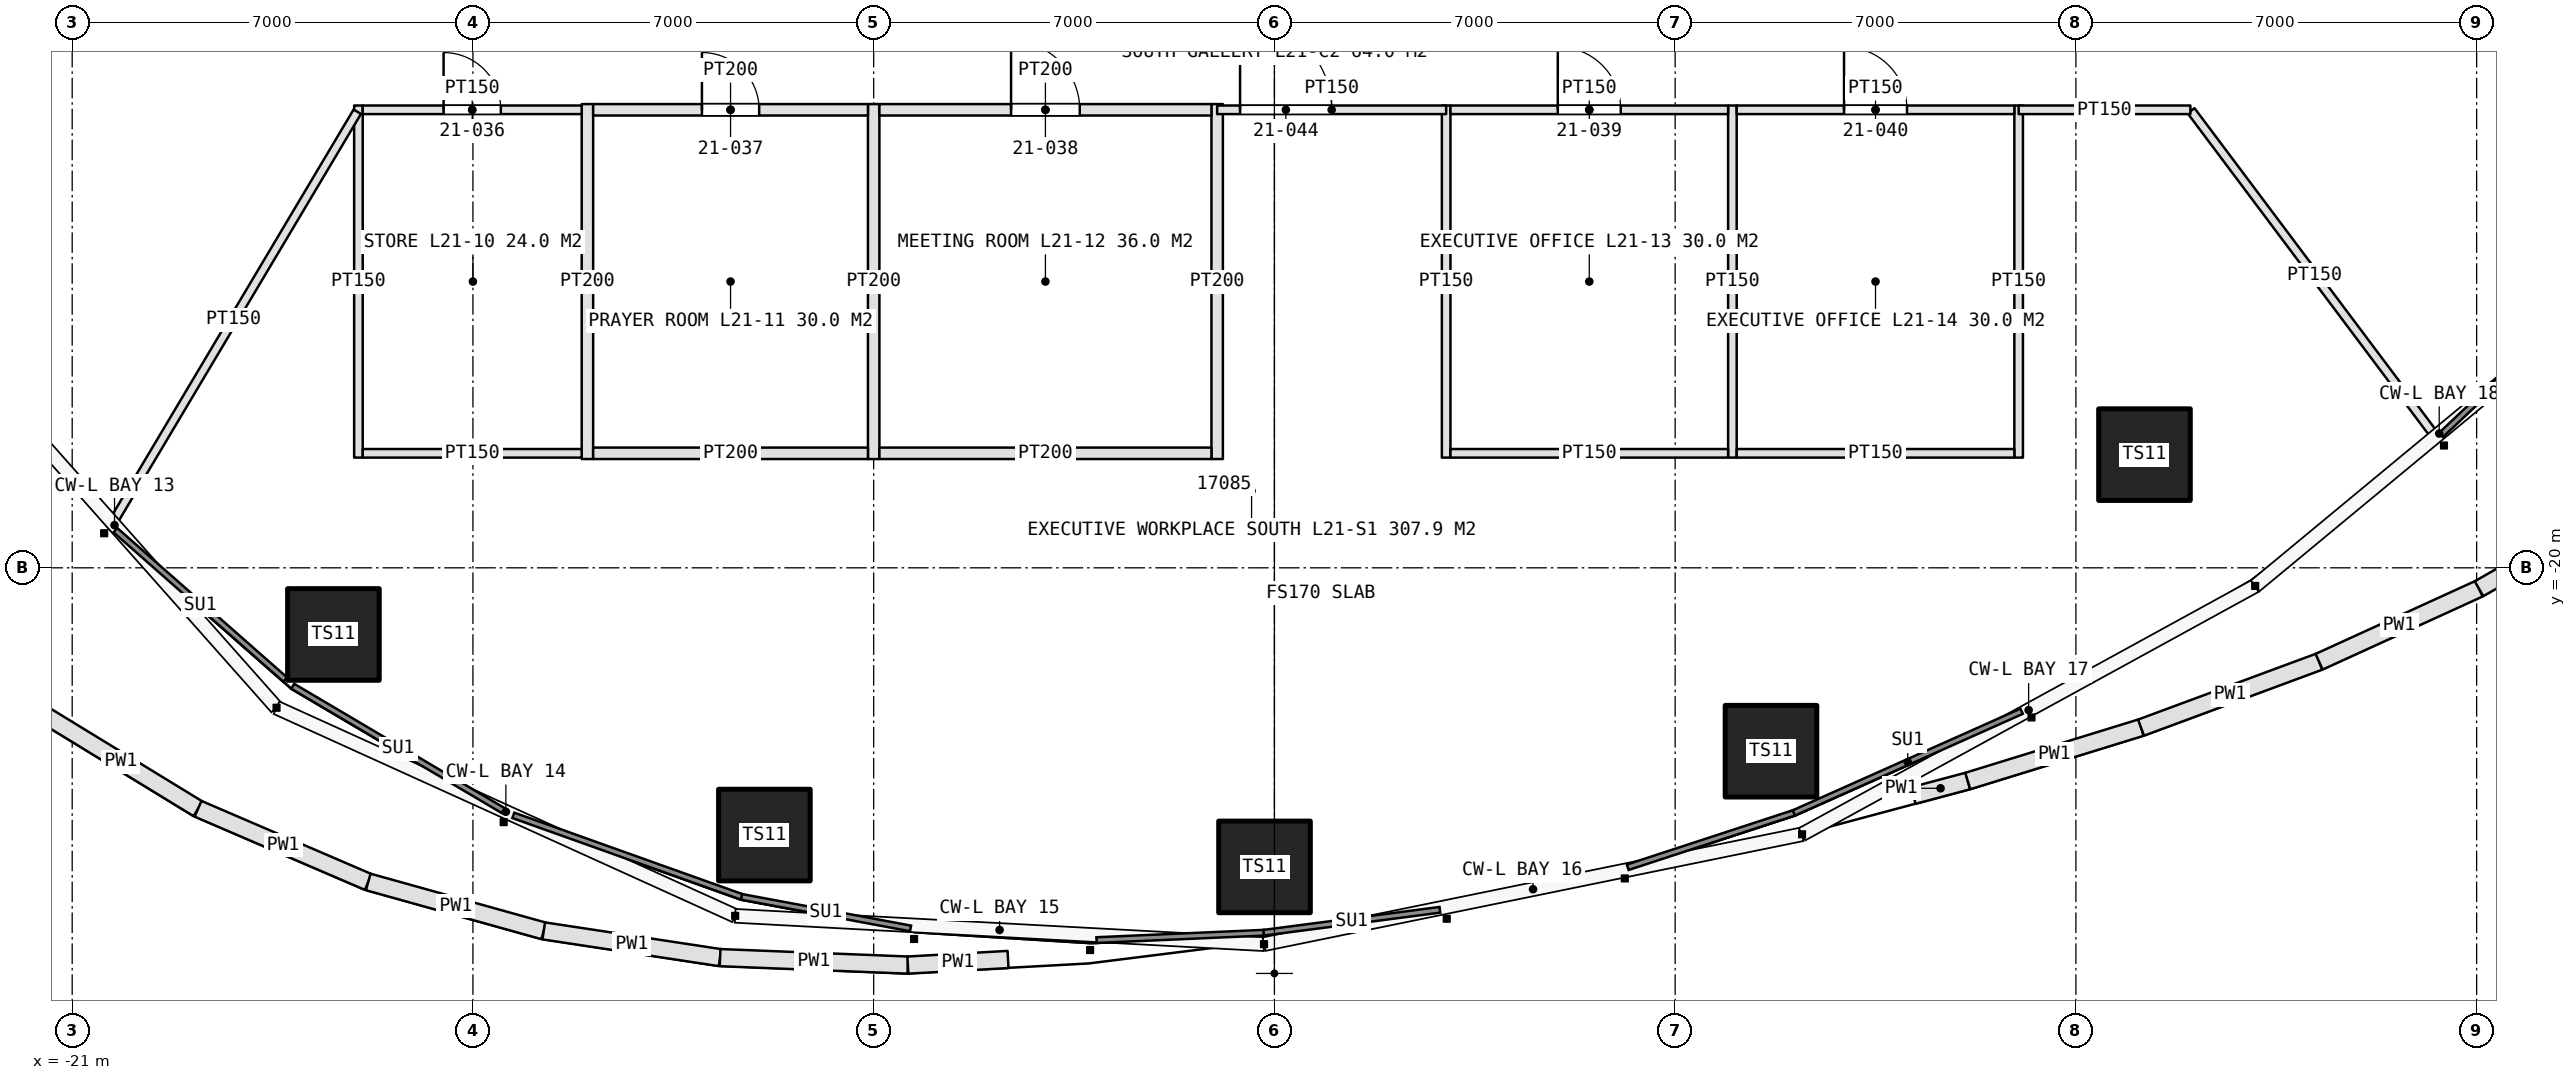
"""IFC4 building model, lengths in metres.
Left out: names, types, materials, properties, quantities, classifications, styles, units other than length and angle.
Written with IfcOpenShell. Run it as: python <this file> out.ifc"""

import sys

from ifc_helpers import new_model, si_unit, direction, frame, frame_2d, origin, origin_2d, place, context, subcontext, project, spatial, rectangle, hollow_rectangle, extrude, element, fill, save


model = new_model("IFC4")
c1 = context("Model", 3, precision=1e-05, world=origin(), true_north=direction((0.0, 1.0)))
c2 = subcontext(c1, "Body", "Model", "MODEL_VIEW")
j1 = project(units=[si_unit("LENGTHUNIT", "METRE"), si_unit("PLANEANGLEUNIT", "RADIAN")], contexts=[c1])
p1 = place(None, origin())
s1 = spatial("IfcSite", under=j1, at=p1, CompositionType="ELEMENT")
p2 = place(p1, origin())
s2 = spatial("IfcBuilding", under=s1, at=p2, CompositionType="ELEMENT")
p3 = place(p2, frame((0.0, 0.0, 105.0)))
s3 = spatial("IfcBuildingStorey", under=s2, at=p3, CompositionType="ELEMENT", Elevation=105.0)
p4 = place(p3, frame((-16.437, -21.164, 0.975), z_axis=(0.0, 0.0, 1.0), x_axis=(1.0, 0.0, 0.0)))
e1 = element("IfcColumn", 1, at=p4, inside=s3, PredefinedType="COLUMN", context=c2, shape_type="SweptSolid", body=[
    extrude(hollow_rectangle(XDim=1.6, YDim=1.6, WallThickness=0.15, at=origin_2d()), origin(), (0.0, 0.0, 1.0), 3.225),
])
for number, where, z_axis, x_axis in (
    (2, (-8.909, -24.668, 0.0), (0.0, 0.0, 1.0), (1.0, 0.0, 0.0)),
    (3, (-0.173, -25.224, 0.0), (0.0, 0.0, 1.0), (1.0, 0.0, 0.0)),
    (4, (8.674, -23.203, 0.0), (0.0, 0.0, 1.0), (1.0, 0.0, 0.0)),
):
    element("IfcColumn", number, at=place(p3, frame(where, z_axis=z_axis, x_axis=x_axis)), inside=s3, PredefinedType="COLUMN", context=c2, shape_type="SweptSolid", body=[
        extrude(hollow_rectangle(XDim=1.6, YDim=1.6, WallThickness=0.15, at=origin_2d()), origin(), (0.0, 0.0, 1.0), 4.2),
    ])
p5 = place(p3, frame((15.198, -18.023, 0.975), z_axis=(0.0, 0.0, 1.0), x_axis=(1.0, 0.0, 0.0)))
e5 = element("IfcColumn", 5, at=p5, inside=s3, PredefinedType="COLUMN", context=c2, shape_type="SweptSolid", body=[
    extrude(hollow_rectangle(XDim=1.6, YDim=1.6, WallThickness=0.15, at=origin_2d()), origin(), (0.0, 0.0, 1.0), 3.225),
])
p6 = place(p3, frame((-21.496, -22.562, 0.0), z_axis=(0.0, 0.0, 1.0), x_axis=(0.853268453742, -0.52147190322, 0.0)))
e6 = element("IfcWall", 6, at=p6, inside=s3, PredefinedType="PARAPET", context=c2, shape_type="SweptSolid", body=[
    extrude(rectangle(XDim=3.157, YDim=0.3, at=frame_2d((1.579, 0.0))), origin(), (0.0, 0.0, 1.0), 1.1),
])
p7 = place(p3, frame((-18.802, -24.209, 0.0), z_axis=(0.0, 0.0, 1.0), x_axis=(0.91866042568, -0.395048126549, 0.0)))
e7 = element("IfcWall", 7, at=p7, inside=s3, PredefinedType="PARAPET", context=c2, shape_type="SweptSolid", body=[
    extrude(rectangle(XDim=3.236, YDim=0.3, at=frame_2d((1.618, 0.0))), origin(), (0.0, 0.0, 1.0), 1.1),
])
p8 = place(p3, frame((-15.829, -25.487, 0.0), z_axis=(0.0, 0.0, 1.0), x_axis=(0.963292299326, -0.26845473745, 0.0)))
e8 = element("IfcWall", 8, at=p8, inside=s3, PredefinedType="PARAPET", context=c2, shape_type="SweptSolid", body=[
    extrude(rectangle(XDim=3.183, YDim=0.3, at=frame_2d((1.592, 0.0))), origin(), (0.0, 0.0, 1.0), 1.1),
])
p9 = place(p3, frame((-12.763, -26.342, 0.0), z_axis=(0.0, 0.0, 1.0), x_axis=(0.988698262217, -0.1499191325, 0.0)))
e9 = element("IfcWall", 9, at=p9, inside=s3, PredefinedType="PARAPET", context=c2, shape_type="SweptSolid", body=[
    extrude(rectangle(XDim=3.115, YDim=0.3, at=frame_2d((1.558, 0.0))), origin(), (0.0, 0.0, 1.0), 1.1),
])
p10 = place(p3, frame((-9.683, -26.809, 0.0), z_axis=(0.0, 0.0, 1.0), x_axis=(0.999210908171, -0.039718522031, 0.0)))
e10 = element("IfcWall", 10, at=p10, inside=s3, PredefinedType="PARAPET", context=c2, shape_type="SweptSolid", body=[
    extrude(rectangle(XDim=3.282, YDim=0.3, at=frame_2d((1.641, 0.0))), origin(), (0.0, 0.0, 1.0), 1.1),
])
p11 = place(p3, frame((-6.403, -26.939, 0.0), z_axis=(0.0, 0.0, 1.0), x_axis=(0.998438849292, 0.055855744778, 0.0)))
e11 = element("IfcWall", 11, at=p11, inside=s3, PredefinedType="PARAPET", context=c2, shape_type="SweptSolid", body=[
    extrude(rectangle(XDim=1.753, YDim=0.3, at=frame_2d((0.876, 0.0))), origin(), (0.0, 0.0, 1.0), 1.1),
])
p12 = place(p3, frame((11.16, -23.978, 0.0), z_axis=(0.0, 0.0, 1.0), x_axis=(0.966230823198, 0.257678086577, 0.0)))
e12 = element("IfcWall", 12, at=p12, inside=s3, PredefinedType="PARAPET", context=c2, shape_type="SweptSolid", body=[
    extrude(rectangle(XDim=0.984, YDim=0.3, at=frame_2d((0.492, 0.0))), origin(), (0.0, 0.0, 1.0), 1.1),
])
p13 = place(p3, frame((12.112, -23.724, 0.0), z_axis=(0.0, 0.0, 1.0), x_axis=(0.955637225942, 0.294546248312, 0.0)))
e13 = element("IfcWall", 13, at=p13, inside=s3, PredefinedType="PARAPET", context=c2, shape_type="SweptSolid", body=[
    extrude(rectangle(XDim=3.167, YDim=0.3, at=frame_2d((1.583, 0.0))), origin(), (0.0, 0.0, 1.0), 1.1),
])
p14 = place(p3, frame((15.138, -22.791, 0.0), z_axis=(0.0, 0.0, 1.0), x_axis=(0.937833090854, 0.347086579543, 0.0)))
e14 = element("IfcWall", 14, at=p14, inside=s3, PredefinedType="PARAPET", context=c2, shape_type="SweptSolid", body=[
    extrude(rectangle(XDim=3.317, YDim=0.3, at=frame_2d((1.658, 0.0))), origin(), (0.0, 0.0, 1.0), 1.1),
])
p15 = place(p3, frame((18.249, -21.64, 0.0), z_axis=(0.0, 0.0, 1.0), x_axis=(0.90970628911, 0.415252293858, 0.0)))
e15 = element("IfcWall", 15, at=p15, inside=s3, PredefinedType="PARAPET", context=c2, shape_type="SweptSolid", body=[
    extrude(rectangle(XDim=3.07, YDim=0.3, at=frame_2d((1.535, 0.0))), origin(), (0.0, 0.0, 1.0), 1.1),
])
p16 = place(p3, frame((21.042, -20.365, 0.0), z_axis=(0.0, 0.0, 1.0), x_axis=(0.867530428681, 0.497384112444, 0.0)))
e16 = element("IfcWall", 16, at=p16, inside=s3, PredefinedType="PARAPET", context=c2, shape_type="SweptSolid", body=[
    extrude(rectangle(XDim=3.187, YDim=0.3, at=frame_2d((1.594, 0.0))), origin(), (0.0, 0.0, 1.0), 1.1),
])
p17 = place(p3, frame((-16.0, -11.925, 0.0), z_axis=(0.0, 0.0, 1.0), x_axis=(0.0, -1.0, 0.0)))
e17 = element("IfcWall", 17, at=p17, inside=s3, PredefinedType="PARTITIONING", context=c2, shape_type="SweptSolid", body=[
    extrude(rectangle(XDim=6.15, YDim=0.15, at=frame_2d((3.075, 0.0))), origin(), (0.0, 0.0, 1.0), 3.0),
])
for number, where, z_axis, x_axis in (
    (18, (-12.0, -11.9, 0.0), (0.0, 0.0, 1.0), (0.0, -1.0, 0.0)),
    (19, (-7.0, -11.9, 0.0), (0.0, 0.0, 1.0), (0.0, -1.0, 0.0)),
    (20, (-1.0, -11.9, 0.0), (0.0, 0.0, 1.0), (0.0, -1.0, 0.0)),
):
    element("IfcWall", number, at=place(p3, frame(where, z_axis=z_axis, x_axis=x_axis)), inside=s3, PredefinedType="PARTITIONING", context=c2, shape_type="SweptSolid", body=[
        extrude(rectangle(XDim=6.2, YDim=0.2, at=frame_2d((3.1, 0.0))), origin(), (0.0, 0.0, 1.0), 3.0),
    ])
p18 = place(p3, frame((-15.925, -12.0, 0.0), z_axis=(0.0, 0.0, 1.0), x_axis=(1.0, 0.0, 0.0)))
e21 = element("IfcWall", 21, at=p18, inside=s3, PredefinedType="PARTITIONING", context=c2, shape_type="SweptSolid", body=[
    extrude(rectangle(XDim=3.825, YDim=0.15, at=frame_2d((1.913, 0.0))), origin(), (0.0, 0.0, 1.0), 3.0),
])
p19 = place(p18, frame((1.413, 0.0, 0.0)))
e22 = element("IfcOpeningElement", 22, at=p19, cuts=e21, PredefinedType="OPENING", context=c2, shape_type="SweptSolid", body=[
    extrude(rectangle(XDim=1.0, YDim=2.2, at=frame_2d((0.5, 1.1))), frame((0.0, 0.085, 0.0), z_axis=(0.0, -1.0, 0.0), x_axis=(1.0, 0.0, 0.0)), (0.0, 0.0, 1.0), 0.17),
])
p20 = place(p3, frame((-15.925, -18.0, 0.0), z_axis=(0.0, 0.0, 1.0), x_axis=(1.0, 0.0, 0.0)))
e23 = element("IfcWall", 23, at=p20, inside=s3, PredefinedType="PARTITIONING", context=c2, shape_type="SweptSolid", body=[
    extrude(rectangle(XDim=3.825, YDim=0.15, at=frame_2d((1.913, 0.0))), origin(), (0.0, 0.0, 1.0), 3.0),
])
p21 = place(p3, frame((-11.9, -12.0, 0.0), z_axis=(0.0, 0.0, 1.0), x_axis=(1.0, 0.0, 0.0)))
e24 = element("IfcWall", 24, at=p21, inside=s3, PredefinedType="PARTITIONING", context=c2, shape_type="SweptSolid", body=[
    extrude(rectangle(XDim=4.8, YDim=0.2, at=frame_2d((2.4, 0.0))), origin(), (0.0, 0.0, 1.0), 3.0),
])
p22 = place(p21, frame((1.9, 0.0, 0.0)))
e25 = element("IfcOpeningElement", 25, at=p22, cuts=e24, PredefinedType="OPENING", context=c2, shape_type="SweptSolid", body=[
    extrude(rectangle(XDim=1.0, YDim=2.2, at=frame_2d((0.5, 1.1))), frame((0.0, 0.11, 0.0), z_axis=(0.0, -1.0, 0.0), x_axis=(1.0, 0.0, 0.0)), (0.0, 0.0, 1.0), 0.22),
])
p23 = place(p3, frame((-11.9, -18.0, 0.0), z_axis=(0.0, 0.0, 1.0), x_axis=(1.0, 0.0, 0.0)))
e26 = element("IfcWall", 26, at=p23, inside=s3, PredefinedType="PARTITIONING", context=c2, shape_type="SweptSolid", body=[
    extrude(rectangle(XDim=4.8, YDim=0.2, at=frame_2d((2.4, 0.0))), origin(), (0.0, 0.0, 1.0), 3.0),
])
p24 = place(p3, frame((-6.9, -12.0, 0.0), z_axis=(0.0, 0.0, 1.0), x_axis=(1.0, 0.0, 0.0)))
e27 = element("IfcWall", 27, at=p24, inside=s3, PredefinedType="PARTITIONING", context=c2, shape_type="SweptSolid", body=[
    extrude(rectangle(XDim=5.8, YDim=0.2, at=frame_2d((2.9, 0.0))), origin(), (0.0, 0.0, 1.0), 3.0),
])
p25 = place(p24, frame((2.3, 0.0, 0.0)))
e28 = element("IfcOpeningElement", 28, at=p25, cuts=e27, PredefinedType="OPENING", context=c2, shape_type="SweptSolid", body=[
    extrude(rectangle(XDim=1.2, YDim=2.4, at=frame_2d((0.6, 1.2))), frame((0.0, 0.11, 0.0), z_axis=(0.0, -1.0, 0.0), x_axis=(1.0, 0.0, 0.0)), (0.0, 0.0, 1.0), 0.22),
])
p26 = place(p3, frame((-6.9, -18.0, 0.0), z_axis=(0.0, 0.0, 1.0), x_axis=(1.0, 0.0, 0.0)))
e29 = element("IfcWall", 29, at=p26, inside=s3, PredefinedType="PARTITIONING", context=c2, shape_type="SweptSolid", body=[
    extrude(rectangle(XDim=5.8, YDim=0.2, at=frame_2d((2.9, 0.0))), origin(), (0.0, 0.0, 1.0), 3.0),
])
for number, where, z_axis, x_axis in (
    (30, (3.0, -11.925, 0.0), (0.0, 0.0, 1.0), (0.0, -1.0, 0.0)),
    (31, (8.0, -11.925, 0.0), (0.0, 0.0, 1.0), (0.0, -1.0, 0.0)),
    (32, (13.0, -11.925, 0.0), (0.0, 0.0, 1.0), (0.0, -1.0, 0.0)),
):
    element("IfcWall", number, at=place(p3, frame(where, z_axis=z_axis, x_axis=x_axis)), inside=s3, PredefinedType="PARTITIONING", context=c2, shape_type="SweptSolid", body=[
        extrude(rectangle(XDim=6.15, YDim=0.15, at=frame_2d((3.075, 0.0))), origin(), (0.0, 0.0, 1.0), 3.0),
    ])
p27 = place(p3, frame((3.075, -12.0, 0.0), z_axis=(0.0, 0.0, 1.0), x_axis=(1.0, 0.0, 0.0)))
e33 = element("IfcWall", 33, at=p27, inside=s3, PredefinedType="PARTITIONING", context=c2, shape_type="SweptSolid", body=[
    extrude(rectangle(XDim=4.85, YDim=0.15, at=frame_2d((2.425, 0.0))), origin(), (0.0, 0.0, 1.0), 3.0),
])
p28 = place(p27, frame((1.875, 0.0, 0.0)))
e34 = element("IfcOpeningElement", 34, at=p28, cuts=e33, PredefinedType="OPENING", context=c2, shape_type="SweptSolid", body=[
    extrude(rectangle(XDim=1.1, YDim=2.3, at=frame_2d((0.55, 1.15))), frame((0.0, 0.085, 0.0), z_axis=(0.0, -1.0, 0.0), x_axis=(1.0, 0.0, 0.0)), (0.0, 0.0, 1.0), 0.17),
])
p29 = place(p3, frame((3.075, -18.0, 0.0), z_axis=(0.0, 0.0, 1.0), x_axis=(1.0, 0.0, 0.0)))
e35 = element("IfcWall", 35, at=p29, inside=s3, PredefinedType="PARTITIONING", context=c2, shape_type="SweptSolid", body=[
    extrude(rectangle(XDim=4.85, YDim=0.15, at=frame_2d((2.425, 0.0))), origin(), (0.0, 0.0, 1.0), 3.0),
])
p30 = place(p3, frame((8.075, -12.0, 0.0), z_axis=(0.0, 0.0, 1.0), x_axis=(1.0, 0.0, 0.0)))
e36 = element("IfcWall", 36, at=p30, inside=s3, PredefinedType="PARTITIONING", context=c2, shape_type="SweptSolid", body=[
    extrude(rectangle(XDim=4.85, YDim=0.15, at=frame_2d((2.425, 0.0))), origin(), (0.0, 0.0, 1.0), 3.0),
])
p31 = place(p30, frame((1.875, 0.0, 0.0)))
e37 = element("IfcOpeningElement", 37, at=p31, cuts=e36, PredefinedType="OPENING", context=c2, shape_type="SweptSolid", body=[
    extrude(rectangle(XDim=1.1, YDim=2.3, at=frame_2d((0.55, 1.15))), frame((0.0, 0.085, 0.0), z_axis=(0.0, -1.0, 0.0), x_axis=(1.0, 0.0, 0.0)), (0.0, 0.0, 1.0), 0.17),
])
p32 = place(p3, frame((8.075, -18.0, 0.0), z_axis=(0.0, 0.0, 1.0), x_axis=(1.0, 0.0, 0.0)))
e38 = element("IfcWall", 38, at=p32, inside=s3, PredefinedType="PARTITIONING", context=c2, shape_type="SweptSolid", body=[
    extrude(rectangle(XDim=4.85, YDim=0.15, at=frame_2d((2.425, 0.0))), origin(), (0.0, 0.0, 1.0), 3.0),
])
p33 = place(p3, frame((-16.02, -12.034, 0.0), z_axis=(0.0, 0.0, 1.0), x_axis=(-0.511518902153, -0.859272024879, 0.0)))
e39 = element("IfcWall", 39, at=p33, inside=s3, PredefinedType="PARTITIONING", context=c2, shape_type="SweptSolid", body=[
    extrude(rectangle(XDim=8.451, YDim=0.15, at=frame_2d((4.226, 0.0))), origin(), (0.0, 0.0, 1.0), 3.0),
])
p34 = place(p3, frame((16.012, -12.016, 0.0), z_axis=(0.0, 0.0, 1.0), x_axis=(0.600059749679, -0.799955184254, 0.0)))
e40 = element("IfcWall", 40, at=p34, inside=s3, PredefinedType="PARTITIONING", context=c2, shape_type="SweptSolid", body=[
    extrude(rectangle(XDim=7.191, YDim=0.15, at=frame_2d((3.596, 0.0))), origin(), (0.0, 0.0, 1.0), 3.0),
])
p35 = place(p3, frame((-1.0, -12.0, 0.0), z_axis=(0.0, 0.0, 1.0), x_axis=(1.0, 0.0, 0.0)))
e41 = element("IfcWall", 41, at=p35, inside=s3, PredefinedType="PARTITIONING", context=c2, shape_type="SweptSolid", body=[
    extrude(rectangle(XDim=4.0, YDim=0.15, at=frame_2d((2.0, 0.0))), origin(), (0.0, 0.0, 1.0), 3.0),
])
p36 = place(p35, frame((0.4, 0.0, 0.0)))
e42 = element("IfcOpeningElement", 42, at=p36, cuts=e41, PredefinedType="OPENING", context=c2, shape_type="SweptSolid", body=[
    extrude(rectangle(XDim=1.6, YDim=2.4, at=frame_2d((0.8, 1.2))), frame((0.0, 0.085, 0.0), z_axis=(0.0, -1.0, 0.0), x_axis=(1.0, 0.0, 0.0)), (0.0, 0.0, 1.0), 0.17),
])
p37 = place(p3, frame((13.0, -12.0, 0.0), z_axis=(0.0, 0.0, 1.0), x_axis=(1.0, 0.0, 0.0)))
e43 = element("IfcWall", 43, at=p37, inside=s3, PredefinedType="PARTITIONING", context=c2, shape_type="SweptSolid", body=[
    extrude(rectangle(XDim=3.0, YDim=0.15, at=frame_2d((1.5, 0.0))), origin(), (0.0, 0.0, 1.0), 3.0),
])
p38 = place(p19, origin())
e44 = element("IfcDoor", 44, at=p38, inside=s3, OperationType="SINGLE_SWING_LEFT", PredefinedType="DOOR", context=c2, shape_type="SweptSolid", body=[
    extrude(rectangle(XDim=1.0, YDim=2.2, at=frame_2d((0.5, 1.1))), frame((0.0, 0.025, 0.0), z_axis=(0.0, -1.0, 0.0), x_axis=(1.0, 0.0, 0.0)), (0.0, 0.0, 1.0), 0.05),
])
fill(e22, e44)
p39 = place(p22, origin())
e45 = element("IfcDoor", 45, at=p39, inside=s3, OperationType="SINGLE_SWING_LEFT", PredefinedType="DOOR", context=c2, shape_type="SweptSolid", body=[
    extrude(rectangle(XDim=1.0, YDim=2.2, at=frame_2d((0.5, 1.1))), frame((0.0, 0.025, 0.0), z_axis=(0.0, -1.0, 0.0), x_axis=(1.0, 0.0, 0.0)), (0.0, 0.0, 1.0), 0.05),
])
fill(e25, e45)
p40 = place(p25, origin())
e46 = element("IfcDoor", 46, at=p40, inside=s3, OperationType="SINGLE_SWING_LEFT", PredefinedType="DOOR", context=c2, shape_type="SweptSolid", body=[
    extrude(rectangle(XDim=1.2, YDim=2.4, at=frame_2d((0.6, 1.2))), frame((0.0, 0.025, 0.0), z_axis=(0.0, -1.0, 0.0), x_axis=(1.0, 0.0, 0.0)), (0.0, 0.0, 1.0), 0.05),
])
fill(e28, e46)
p41 = place(p28, origin())
e47 = element("IfcDoor", 47, at=p41, inside=s3, OperationType="SINGLE_SWING_LEFT", PredefinedType="DOOR", context=c2, shape_type="SweptSolid", body=[
    extrude(rectangle(XDim=1.1, YDim=2.3, at=frame_2d((0.55, 1.15))), frame((0.0, 0.025, 0.0), z_axis=(0.0, -1.0, 0.0), x_axis=(1.0, 0.0, 0.0)), (0.0, 0.0, 1.0), 0.05),
])
fill(e34, e47)
p42 = place(p31, origin())
e48 = element("IfcDoor", 48, at=p42, inside=s3, OperationType="SINGLE_SWING_LEFT", PredefinedType="DOOR", context=c2, shape_type="SweptSolid", body=[
    extrude(rectangle(XDim=1.1, YDim=2.3, at=frame_2d((0.55, 1.15))), frame((0.0, 0.025, 0.0), z_axis=(0.0, -1.0, 0.0), x_axis=(1.0, 0.0, 0.0)), (0.0, 0.0, 1.0), 0.05),
])
fill(e37, e48)
p43 = place(p36, origin())
e49 = element("IfcDoor", 49, at=p43, inside=s3, OperationType="DOUBLE_DOOR_SINGLE_SWING", PredefinedType="DOOR", context=c2, shape_type="SweptSolid", body=[
    extrude(rectangle(XDim=1.6, YDim=2.4, at=frame_2d((0.8, 1.2))), frame((0.0, 0.025, 0.0), z_axis=(0.0, -1.0, 0.0), x_axis=(1.0, 0.0, 0.0)), (0.0, 0.0, 1.0), 0.05),
])
fill(e42, e49)
save(model, sys.argv[1])
